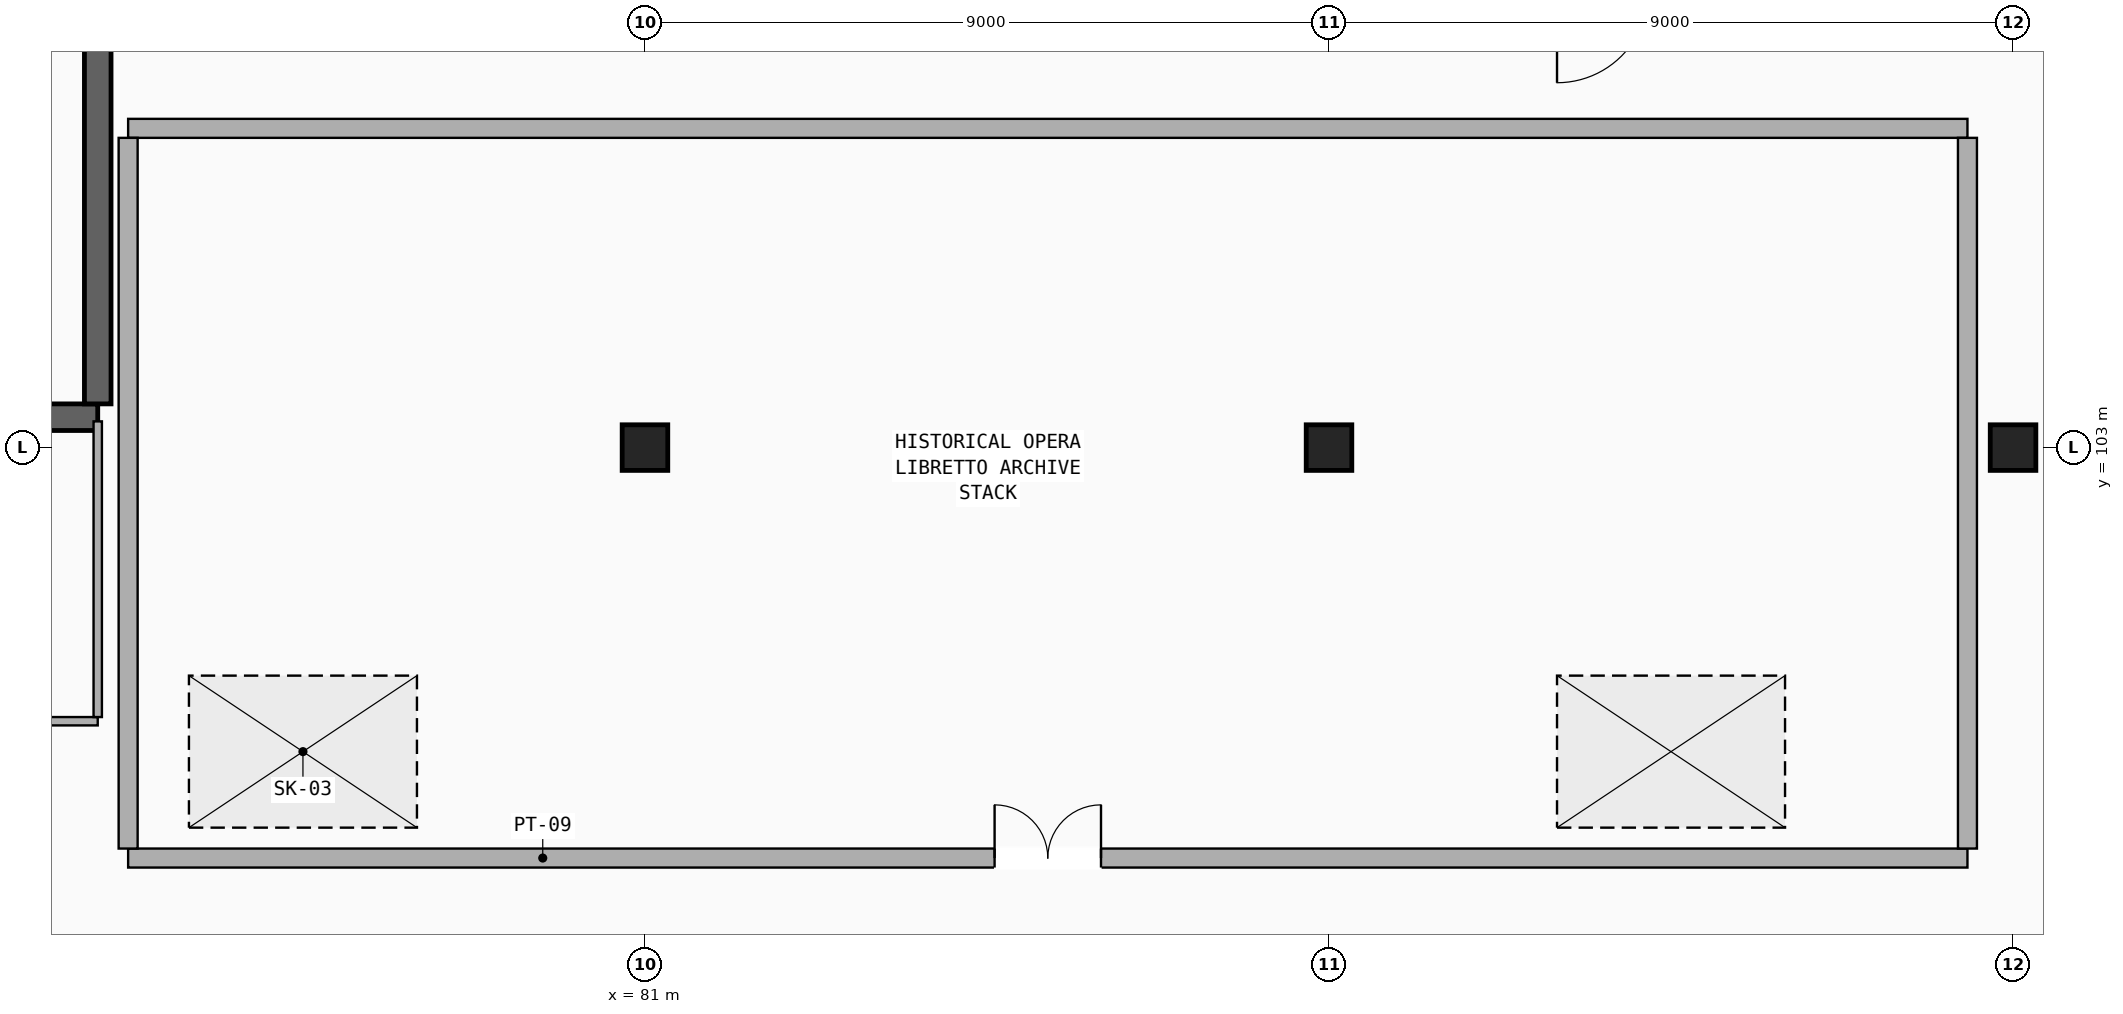
"""IFC4 building model, lengths in metres.
Left out: names, types, materials, properties, quantities, classifications, styles, units other than length and angle.
Written with IfcOpenShell. Run it as: python <this file> out.ifc"""

import sys

from ifc_helpers import new_model, si_unit, direction, frame, frame_2d, origin, origin_2d, place, context, subcontext, project, spatial, rectangle, extrude, element, fill, save


model = new_model("IFC4")
c1 = context("Model", 3, precision=1e-05, world=origin(), true_north=direction((0.0, 1.0)))
c2 = subcontext(c1, "Body", "Model", "MODEL_VIEW")
j1 = project(units=[si_unit("LENGTHUNIT", "METRE"), si_unit("PLANEANGLEUNIT", "RADIAN")], contexts=[c1])
p1 = place(None, origin())
s1 = spatial("IfcSite", under=j1, at=p1, CompositionType="ELEMENT")
p2 = place(p1, origin())
s2 = spatial("IfcBuilding", under=s1, at=p2, CompositionType="ELEMENT")
p3 = place(p2, frame((0.0, 0.0, 17.68)))
s3 = spatial("IfcBuildingStorey", under=s2, at=p3, CompositionType="ELEMENT", Elevation=17.68)
for number, where, z_axis, x_axis in (
    (1, (81.0, 103.0, 0.0), (0.0, 0.0, 1.0), (1.0, 0.0, 0.0)),
    (2, (90.0, 103.0, 0.0), (0.0, 0.0, 1.0), (1.0, 0.0, 0.0)),
    (3, (99.0, 103.0, 0.0), (0.0, 0.0, 1.0), (1.0, 0.0, 0.0)),
):
    element("IfcColumn", number, at=place(p3, frame(where, z_axis=z_axis, x_axis=x_axis)), inside=s3, PredefinedType="COLUMN", context=c2, shape_type="SweptSolid", body=[
        extrude(rectangle(XDim=0.6, YDim=0.6, at=origin_2d()), origin(), (0.0, 0.0, 1.0), 4.08),
    ])
p4 = place(p3, frame((63.5, 103.4, 0.0), z_axis=(0.0, 0.0, 1.0), x_axis=(1.0, 0.0, 0.0)))
e4 = element("IfcWall", 4, at=p4, inside=s3, PredefinedType="SHEAR", context=c2, shape_type="SweptSolid", body=[
    extrude(rectangle(XDim=10.3, YDim=0.35, at=frame_2d((5.15, 0.0))), origin(), (0.0, 0.0, 1.0), 4.08),
])
p5 = place(p4, frame((0.45, 0.0, 0.0)))
e5 = element("IfcOpeningElement", 5, at=p5, cuts=e4, PredefinedType="OPENING", context=c2, shape_type="SweptSolid", body=[
    extrude(rectangle(XDim=1.1, YDim=2.2, at=frame_2d((0.55, 1.1))), frame((0.0, 0.185, 0.0), z_axis=(0.0, -1.0, 0.0), x_axis=(1.0, 0.0, 0.0)), (0.0, 0.0, 1.0), 0.37),
])
p6 = place(p4, frame((5.54, 0.0, 0.0)))
e6 = element("IfcOpeningElement", 6, at=p6, cuts=e4, PredefinedType="OPENING", context=c2, shape_type="SweptSolid", body=[
    extrude(rectangle(XDim=1.12, YDim=2.16, at=frame_2d((0.56, 1.08))), frame((0.0, 0.185, 0.0), z_axis=(0.0, -1.0, 0.0), x_axis=(1.0, 0.0, 0.0)), (0.0, 0.0, 1.0), 0.37),
])
p7 = place(p3, frame((73.8, 103.575, 0.0), z_axis=(0.0, 0.0, 1.0), x_axis=(0.0, 1.0, 0.0)))
e7 = element("IfcWall", 7, at=p7, inside=s3, PredefinedType="SHEAR", context=c2, shape_type="SweptSolid", body=[
    extrude(rectangle(XDim=8.05, YDim=0.35, at=frame_2d((4.025, 0.0))), origin(), (0.0, 0.0, 1.0), 4.08),
])
p8 = place(p3, frame((63.295, 99.4, 0.0), z_axis=(0.0, 0.0, 1.0), x_axis=(1.0, 0.0, 0.0)))
e8 = element("IfcWall", 8, at=p8, inside=s3, PredefinedType="PARTITIONING", context=c2, shape_type="SweptSolid", body=[
    extrude(rectangle(XDim=10.505, YDim=0.11, at=frame_2d((5.252, 0.0))), origin(), (0.0, 0.0, 1.0), 3.277),
])
p9 = place(p8, frame((4.552, 0.0, 0.0)))
e9 = element("IfcOpeningElement", 9, at=p9, cuts=e8, PredefinedType="OPENING", context=c2, shape_type="SweptSolid", body=[
    extrude(rectangle(XDim=1.4, YDim=2.2, at=frame_2d((0.7, 1.1))), frame((0.0, 0.065, 0.0), z_axis=(0.0, -1.0, 0.0), x_axis=(1.0, 0.0, 0.0)), (0.0, 0.0, 1.0), 0.13),
])
p10 = place(p3, frame((73.8, 99.455, 0.0), z_axis=(0.0, 0.0, 1.0), x_axis=(0.0, 1.0, 0.0)))
e10 = element("IfcWall", 10, at=p10, inside=s3, PredefinedType="PARTITIONING", context=c2, shape_type="SweptSolid", body=[
    extrude(rectangle(XDim=3.89, YDim=0.11, at=frame_2d((1.945, 0.0))), origin(), (0.0, 0.0, 1.0), 3.84),
])
p11 = place(p3, frame((74.2, 97.6, 0.0), z_axis=(0.0, 0.0, 1.0), x_axis=(1.0, 0.0, 0.0)))
e11 = element("IfcWall", 11, at=p11, inside=s3, PredefinedType="PARTITIONING", context=c2, shape_type="SweptSolid", body=[
    extrude(rectangle(XDim=24.2, YDim=0.25, at=frame_2d((12.1, 0.0))), origin(), (0.0, 0.0, 1.0), 3.277),
])
p12 = place(p11, frame((11.4, 0.0, 0.0)))
e12 = element("IfcOpeningElement", 12, at=p12, cuts=e11, PredefinedType="OPENING", context=c2, shape_type="SweptSolid", body=[
    extrude(rectangle(XDim=1.4, YDim=2.2, at=frame_2d((0.7, 1.1))), frame((0.0, 0.135, 0.0), z_axis=(0.0, -1.0, 0.0), x_axis=(1.0, 0.0, 0.0)), (0.0, 0.0, 1.0), 0.27),
])
p13 = place(p3, frame((74.2, 107.2, 0.0), z_axis=(0.0, 0.0, 1.0), x_axis=(1.0, 0.0, 0.0)))
e13 = element("IfcWall", 13, at=p13, inside=s3, PredefinedType="PARTITIONING", context=c2, shape_type="SweptSolid", body=[
    extrude(rectangle(XDim=24.2, YDim=0.25, at=frame_2d((12.1, 0.0))), origin(), (0.0, 0.0, 1.0), 3.277),
])
for number, where, z_axis, x_axis in (
    (14, (74.2, 97.725, 0.0), (0.0, 0.0, 1.0), (0.0, 1.0, 0.0)),
    (15, (98.4, 97.725, 0.0), (0.0, 0.0, 1.0), (0.0, 1.0, 0.0)),
):
    element("IfcWall", number, at=place(p3, frame(where, z_axis=z_axis, x_axis=x_axis)), inside=s3, PredefinedType="PARTITIONING", context=c2, shape_type="SweptSolid", body=[
        extrude(rectangle(XDim=9.35, YDim=0.25, at=frame_2d((4.675, 0.0))), origin(), (0.0, 0.0, 1.0), 3.84),
    ])
p14 = place(p3, frame((0.0, 0.0, -0.24)))
p15 = place(p14, frame((76.5, 99.0, 0.19)))
e16 = element("IfcWindow", 16, at=p15, inside=s3, PartitioningType="SINGLE_PANEL", PredefinedType="SKYLIGHT", context=c2, shape_type="SweptSolid", body=[
    extrude(rectangle(XDim=3.0, YDim=2.0, at=origin_2d()), origin(), (0.0, 0.0, 1.0), 0.05),
])
p16 = place(p14, frame((94.5, 99.0, 0.19)))
e17 = element("IfcWindow", 17, at=p16, inside=s3, PartitioningType="SINGLE_PANEL", PredefinedType="SKYLIGHT", context=c2, shape_type="SweptSolid", body=[
    extrude(rectangle(XDim=3.0, YDim=2.0, at=origin_2d()), origin(), (0.0, 0.0, 1.0), 0.05),
])
p17 = place(p12, origin())
e18 = element("IfcDoor", 18, at=p17, inside=s3, OperationType="DOUBLE_DOOR_SINGLE_SWING", PredefinedType="DOOR", context=c2, shape_type="SweptSolid", body=[
    extrude(rectangle(XDim=1.4, YDim=2.2, at=frame_2d((0.7, 1.1))), frame((0.0, 0.025, 0.0), z_axis=(0.0, -1.0, 0.0), x_axis=(1.0, 0.0, 0.0)), (0.0, 0.0, 1.0), 0.05),
])
fill(e12, e18)
save(model, sys.argv[1])
